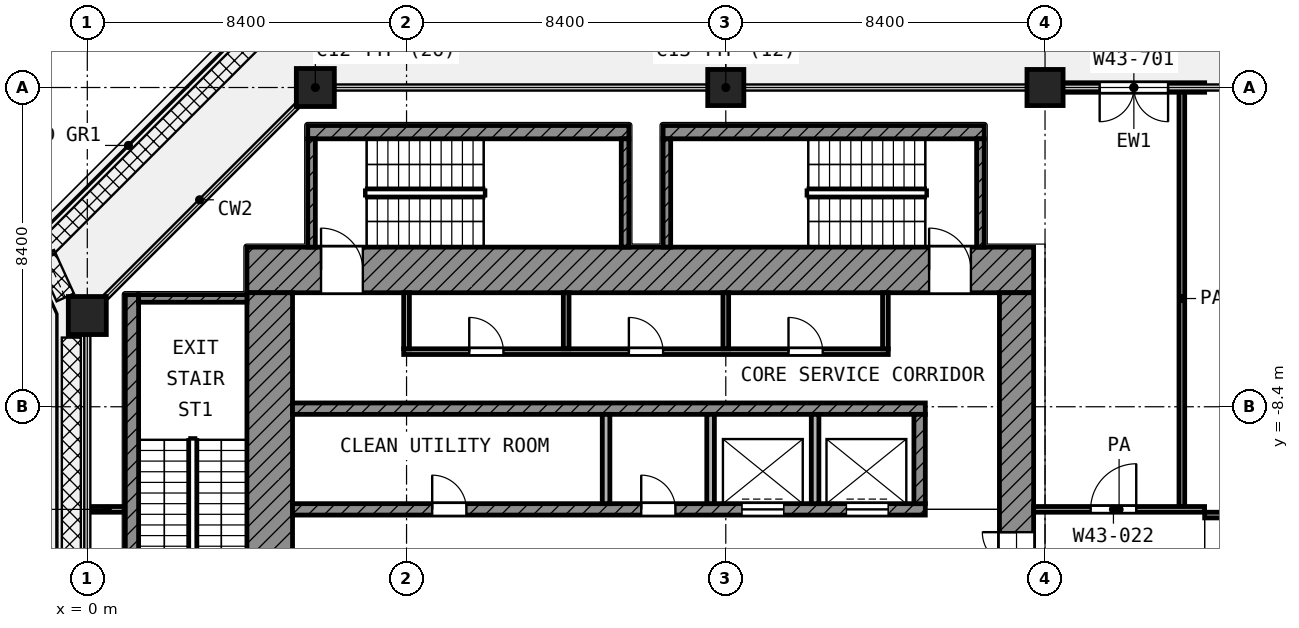
"""IFC4 building model, lengths in metres.
Left out: names, types, materials, properties, quantities, classifications, styles, units other than length and angle.
Written with IfcOpenShell. Run it as: python <this file> out.ifc"""

import sys

from ifc_helpers import new_model, si_unit, direction, frame, frame_2d, origin, origin_2d, place, context, subcontext, project, spatial, rectangle, extrude, element, fill, save


model = new_model("IFC4")
c1 = context("Model", 3, precision=1e-05, world=origin(), true_north=direction((0.0, 1.0)))
c2 = subcontext(c1, "Body", "Model", "MODEL_VIEW")
j1 = project(units=[si_unit("LENGTHUNIT", "METRE"), si_unit("PLANEANGLEUNIT", "RADIAN")], contexts=[c1])
p1 = place(None, origin())
s1 = spatial("IfcSite", under=j1, at=p1, CompositionType="ELEMENT")
p2 = place(p1, origin())
s2 = spatial("IfcBuilding", under=s1, at=p2, CompositionType="ELEMENT")
p3 = place(p2, frame((0.0, 0.0, 187.8)))
s3 = spatial("IfcBuildingStorey", under=s2, at=p3, CompositionType="ELEMENT", Elevation=187.8)
p4 = place(p3, frame((6.0, 0.0, 0.0), z_axis=(0.0, 0.0, 1.0), x_axis=(1.0, 0.0, 0.0)))
e1 = element("IfcColumn", 1, at=p4, inside=s3, PredefinedType="COLUMN", context=c2, shape_type="SweptSolid", body=[
    extrude(rectangle(XDim=1.0, YDim=1.0, at=origin_2d()), origin(), (0.0, 0.0, 1.0), 4.2),
])
for number, where, z_axis, x_axis in (
    (2, (16.8, 0.0, 0.0), (0.0, 0.0, 1.0), (1.0, 0.0, 0.0)),
    (3, (25.2, 0.0, 0.0), (0.0, 0.0, 1.0), (1.0, 0.0, 0.0)),
):
    element("IfcColumn", number, at=place(p3, frame(where, z_axis=z_axis, x_axis=x_axis)), inside=s3, PredefinedType="COLUMN", context=c2, shape_type="SweptSolid", body=[
        extrude(rectangle(XDim=0.95, YDim=0.95, at=origin_2d()), origin(), (0.0, 0.0, 1.0), 4.2),
    ])
p5 = place(p3, frame((0.0, -6.0, 0.0), z_axis=(0.0, 0.0, 1.0), x_axis=(1.0, 0.0, 0.0)))
e4 = element("IfcColumn", 4, at=p5, inside=s3, PredefinedType="COLUMN", context=c2, shape_type="SweptSolid", body=[
    extrude(rectangle(XDim=1.0, YDim=1.0, at=origin_2d()), origin(), (0.0, 0.0, 1.0), 4.2),
])
p6 = place(p3, frame((29.4, 0.0, 0.0), z_axis=(0.0, 0.0, 1.0), x_axis=(-1.0, 0.0, 0.0)))
e5 = element("IfcWall", 5, at=p6, inside=s3, PredefinedType="SOLIDWALL", context=c2, shape_type="SweptSolid", body=[
    extrude(rectangle(XDim=3.725, YDim=0.25, at=frame_2d((1.862, 0.0))), origin(), (0.0, 0.0, 1.0), 2.58),
])
p7 = place(p6, frame((0.962, 0.0, 0.0)))
e6 = element("IfcOpeningElement", 6, at=p7, cuts=e5, PredefinedType="OPENING", context=c2, shape_type="SweptSolid", body=[
    extrude(rectangle(XDim=1.8, YDim=2.1, at=frame_2d((0.9, 1.05))), frame((0.0, 0.135, 0.0), z_axis=(0.0, -1.0, 0.0), x_axis=(1.0, 0.0, 0.0)), (0.0, 0.0, 1.0), 0.27),
])
p8 = place(p3, frame((4.2, -4.8, 0.0), z_axis=(0.0, 0.0, 1.0), x_axis=(1.0, 0.0, 0.0)))
e7 = element("IfcWall", 7, at=p8, inside=s3, PredefinedType="SHEAR", context=c2, shape_type="SweptSolid", body=[
    extrude(rectangle(XDim=20.7, YDim=1.2, at=frame_2d((10.35, 0.0))), origin(), (0.0, 0.0, 1.0), 3.6),
])
p9 = place(p8, frame((1.95, 0.0, 0.0)))
e8 = element("IfcOpeningElement", 8, at=p9, cuts=e7, PredefinedType="OPENING", context=c2, shape_type="SweptSolid", body=[
    extrude(rectangle(XDim=1.1, YDim=2.1, at=frame_2d((0.55, 1.05))), frame((0.0, 0.61, 0.0), z_axis=(0.0, -1.0, 0.0), x_axis=(1.0, 0.0, 0.0)), (0.0, 0.0, 1.0), 1.22),
])
p10 = place(p8, frame((17.95, 0.0, 0.0)))
e9 = element("IfcOpeningElement", 9, at=p10, cuts=e7, PredefinedType="OPENING", context=c2, shape_type="SweptSolid", body=[
    extrude(rectangle(XDim=1.1, YDim=2.1, at=frame_2d((0.55, 1.05))), frame((0.0, 0.61, 0.0), z_axis=(0.0, -1.0, 0.0), x_axis=(1.0, 0.0, 0.0)), (0.0, 0.0, 1.0), 1.22),
])
p11 = place(p3, frame((4.8, -24.9, 0.0), z_axis=(0.0, 0.0, 1.0), x_axis=(0.0, 1.0, 0.0)))
e10 = element("IfcWall", 10, at=p11, inside=s3, PredefinedType="SHEAR", context=c2, shape_type="SweptSolid", body=[
    extrude(rectangle(XDim=19.5, YDim=1.2, at=frame_2d((9.75, 0.0))), origin(), (0.0, 0.0, 1.0), 3.6),
])
p12 = place(p11, frame((11.35, 0.0, 0.0)))
e11 = element("IfcOpeningElement", 11, at=p12, cuts=e10, PredefinedType="OPENING", context=c2, shape_type="SweptSolid", body=[
    extrude(rectangle(XDim=1.1, YDim=2.1, at=frame_2d((0.55, 1.05))), frame((0.0, 0.61, 0.0), z_axis=(0.0, -1.0, 0.0), x_axis=(1.0, 0.0, 0.0)), (0.0, 0.0, 1.0), 1.22),
])
p13 = place(p11, frame((2.05, 0.0, 0.0)))
e12 = element("IfcOpeningElement", 12, at=p13, cuts=e10, PredefinedType="OPENING", context=c2, shape_type="SweptSolid", body=[
    extrude(rectangle(XDim=1.1, YDim=2.1, at=frame_2d((0.55, 1.05))), frame((0.0, 0.61, 0.0), z_axis=(0.0, -1.0, 0.0), x_axis=(1.0, 0.0, 0.0)), (0.0, 0.0, 1.0), 1.22),
])
p14 = place(p3, frame((24.45, -24.0, 0.0), z_axis=(0.0, 0.0, 1.0), x_axis=(0.0, 1.0, 0.0)))
e13 = element("IfcWall", 13, at=p14, inside=s3, PredefinedType="SHEAR", context=c2, shape_type="SweptSolid", body=[
    extrude(rectangle(XDim=18.6, YDim=0.9, at=frame_2d((9.3, 0.0))), origin(), (0.0, 0.0, 1.0), 3.6),
])
p15 = place(p14, frame((10.5, 0.0, 0.0)))
e14 = element("IfcOpeningElement", 14, at=p15, cuts=e13, PredefinedType="OPENING", context=c2, shape_type="SweptSolid", body=[
    extrude(rectangle(XDim=1.8, YDim=2.1, at=frame_2d((0.9, 1.05))), frame((0.0, 0.46, 0.0), z_axis=(0.0, -1.0, 0.0), x_axis=(1.0, 0.0, 0.0)), (0.0, 0.0, 1.0), 0.92),
])
p16 = place(p3, frame((5.4, -8.45, 0.0), z_axis=(0.0, 0.0, 1.0), x_axis=(1.0, 0.0, 0.0)))
e15 = element("IfcWall", 15, at=p16, inside=s3, PredefinedType="SHEAR", context=c2, shape_type="SweptSolid", body=[
    extrude(rectangle(XDim=16.65, YDim=0.3, at=frame_2d((8.325, 0.0))), origin(), (0.0, 0.0, 1.0), 3.6),
])
p17 = place(p3, frame((5.4, -11.1, 0.0), z_axis=(0.0, 0.0, 1.0), x_axis=(1.0, 0.0, 0.0)))
e16 = element("IfcWall", 16, at=p17, inside=s3, PredefinedType="SHEAR", context=c2, shape_type="SweptSolid", body=[
    extrude(rectangle(XDim=16.65, YDim=0.3, at=frame_2d((8.325, 0.0))), origin(), (0.0, 0.0, 1.0), 3.6),
])
p18 = place(p17, frame((11.825, 0.0, 0.0)))
e17 = element("IfcOpeningElement", 17, at=p18, cuts=e16, PredefinedType="OPENING", context=c2, shape_type="SweptSolid", body=[
    extrude(rectangle(XDim=1.1, YDim=2.1, at=frame_2d((0.55, 1.05))), frame((0.0, 0.16, 0.0), z_axis=(0.0, -1.0, 0.0), x_axis=(1.0, 0.0, 0.0)), (0.0, 0.0, 1.0), 0.32),
])
p19 = place(p17, frame((14.575, 0.0, 0.0)))
e18 = element("IfcOpeningElement", 18, at=p19, cuts=e16, PredefinedType="OPENING", context=c2, shape_type="SweptSolid", body=[
    extrude(rectangle(XDim=1.1, YDim=2.1, at=frame_2d((0.55, 1.05))), frame((0.0, 0.16, 0.0), z_axis=(0.0, -1.0, 0.0), x_axis=(1.0, 0.0, 0.0)), (0.0, 0.0, 1.0), 0.32),
])
p20 = place(p17, frame((3.675, 0.0, 0.0)))
e19 = element("IfcOpeningElement", 19, at=p20, cuts=e16, PredefinedType="OPENING", context=c2, shape_type="SweptSolid", body=[
    extrude(rectangle(XDim=0.9, YDim=2.1, at=frame_2d((0.45, 1.05))), frame((0.0, 0.16, 0.0), z_axis=(0.0, -1.0, 0.0), x_axis=(1.0, 0.0, 0.0)), (0.0, 0.0, 1.0), 0.32),
])
p21 = place(p17, frame((9.175, 0.0, 0.0)))
e20 = element("IfcOpeningElement", 20, at=p21, cuts=e16, PredefinedType="OPENING", context=c2, shape_type="SweptSolid", body=[
    extrude(rectangle(XDim=0.9, YDim=2.1, at=frame_2d((0.45, 1.05))), frame((0.0, 0.16, 0.0), z_axis=(0.0, -1.0, 0.0), x_axis=(1.0, 0.0, 0.0)), (0.0, 0.0, 1.0), 0.32),
])
p22 = place(p3, frame((21.9, -10.95, 0.0), z_axis=(0.0, 0.0, 1.0), x_axis=(0.0, 1.0, 0.0)))
e21 = element("IfcWall", 21, at=p22, inside=s3, PredefinedType="SHEAR", context=c2, shape_type="SweptSolid", body=[
    extrude(rectangle(XDim=2.35, YDim=0.3, at=frame_2d((1.175, 0.0))), origin(), (0.0, 0.0, 1.0), 3.6),
])
for number, where, z_axis, x_axis in (
    (22, (13.65, -10.95, 0.0), (0.0, 0.0, 1.0), (0.0, 1.0, 0.0)),
    (23, (16.4, -10.95, 0.0), (0.0, 0.0, 1.0), (0.0, 1.0, 0.0)),
    (24, (19.15, -10.95, 0.0), (0.0, 0.0, 1.0), (0.0, 1.0, 0.0)),
):
    element("IfcWall", number, at=place(p3, frame(where, z_axis=z_axis, x_axis=x_axis)), inside=s3, PredefinedType="PARTITIONING", context=c2, shape_type="SweptSolid", body=[
        extrude(rectangle(XDim=2.35, YDim=0.2, at=frame_2d((1.175, 0.0))), origin(), (0.0, 0.0, 1.0), 3.6),
    ])
p23 = place(p3, frame((8.325, -6.95, 0.0), z_axis=(0.0, 0.0, 1.0), x_axis=(1.0, 0.0, 0.0)))
e25 = element("IfcWall", 25, at=p23, inside=s3, PredefinedType="PARTITIONING", context=c2, shape_type="SweptSolid", body=[
    extrude(rectangle(XDim=12.75, YDim=0.15, at=frame_2d((6.375, 0.0))), origin(), (0.0, 0.0, 1.0), 3.6),
])
p24 = place(p23, frame((1.725, 0.0, 0.0)))
e26 = element("IfcOpeningElement", 26, at=p24, cuts=e25, PredefinedType="OPENING", context=c2, shape_type="SweptSolid", body=[
    extrude(rectangle(XDim=0.9, YDim=2.1, at=frame_2d((0.45, 1.05))), frame((0.0, 0.085, 0.0), z_axis=(0.0, -1.0, 0.0), x_axis=(1.0, 0.0, 0.0)), (0.0, 0.0, 1.0), 0.17),
])
p25 = place(p23, frame((5.925, 0.0, 0.0)))
e27 = element("IfcOpeningElement", 27, at=p25, cuts=e25, PredefinedType="OPENING", context=c2, shape_type="SweptSolid", body=[
    extrude(rectangle(XDim=0.9, YDim=2.1, at=frame_2d((0.45, 1.05))), frame((0.0, 0.085, 0.0), z_axis=(0.0, -1.0, 0.0), x_axis=(1.0, 0.0, 0.0)), (0.0, 0.0, 1.0), 0.17),
])
p26 = place(p23, frame((10.125, 0.0, 0.0)))
e28 = element("IfcOpeningElement", 28, at=p26, cuts=e25, PredefinedType="OPENING", context=c2, shape_type="SweptSolid", body=[
    extrude(rectangle(XDim=0.9, YDim=2.1, at=frame_2d((0.45, 1.05))), frame((0.0, 0.085, 0.0), z_axis=(0.0, -1.0, 0.0), x_axis=(1.0, 0.0, 0.0)), (0.0, 0.0, 1.0), 0.17),
])
for number, where, z_axis, x_axis in (
    (29, (8.4, -6.875, 0.0), (0.0, 0.0, 1.0), (0.0, 1.0, 0.0)),
    (30, (12.6, -6.875, 0.0), (0.0, 0.0, 1.0), (0.0, 1.0, 0.0)),
    (31, (16.8, -6.875, 0.0), (0.0, 0.0, 1.0), (0.0, 1.0, 0.0)),
    (32, (21.0, -6.875, 0.0), (0.0, 0.0, 1.0), (0.0, 1.0, 0.0)),
):
    element("IfcWall", number, at=place(p3, frame(where, z_axis=z_axis, x_axis=x_axis)), inside=s3, PredefinedType="PARTITIONING", context=c2, shape_type="SweptSolid", body=[
        extrude(rectangle(XDim=1.475, YDim=0.15, at=frame_2d((0.738, 0.0))), origin(), (0.0, 0.0, 1.0), 3.6),
    ])
p27 = place(p3, frame((1.175, -13.9, 0.0), z_axis=(0.0, 0.0, 1.0), x_axis=(0.0, 1.0, 0.0)))
e33 = element("IfcWall", 33, at=p27, inside=s3, PredefinedType="SHEAR", context=c2, shape_type="SweptSolid", body=[
    extrude(rectangle(XDim=8.45, YDim=0.35, at=frame_2d((4.225, 0.0))), origin(), (0.0, 0.0, 1.0), 3.6),
])
p28 = place(p3, frame((1.35, -5.55, 0.0), z_axis=(0.0, 0.0, 1.0), x_axis=(1.0, 0.0, 0.0)))
e34 = element("IfcWall", 34, at=p28, inside=s3, PredefinedType="SHEAR", context=c2, shape_type="SweptSolid", body=[
    extrude(rectangle(XDim=2.85, YDim=0.2, at=frame_2d((1.425, 0.0))), origin(), (0.0, 0.0, 1.0), 3.6),
])
p29 = place(p3, frame((5.8, -1.175, 0.0), z_axis=(0.0, 0.0, 1.0), x_axis=(1.0, 0.0, 0.0)))
e35 = element("IfcWall", 35, at=p29, inside=s3, PredefinedType="SHEAR", context=c2, shape_type="SweptSolid", body=[
    extrude(rectangle(XDim=8.45, YDim=0.35, at=frame_2d((4.225, 0.0))), origin(), (0.0, 0.0, 1.0), 3.6),
])
for number, where, z_axis, x_axis in (
    (36, (5.9, -4.2, 0.0), (0.0, 0.0, 1.0), (0.0, 1.0, 0.0)),
    (37, (14.15, -4.2, 0.0), (0.0, 0.0, 1.0), (0.0, 1.0, 0.0)),
):
    element("IfcWall", number, at=place(p3, frame(where, z_axis=z_axis, x_axis=x_axis)), inside=s3, PredefinedType="SHEAR", context=c2, shape_type="SweptSolid", body=[
        extrude(rectangle(XDim=2.85, YDim=0.2, at=frame_2d((1.425, 0.0))), origin(), (0.0, 0.0, 1.0), 3.6),
    ])
p30 = place(p3, frame((15.15, -1.175, 0.0), z_axis=(0.0, 0.0, 1.0), x_axis=(1.0, 0.0, 0.0)))
e38 = element("IfcWall", 38, at=p30, inside=s3, PredefinedType="SHEAR", context=c2, shape_type="SweptSolid", body=[
    extrude(rectangle(XDim=8.45, YDim=0.35, at=frame_2d((4.225, 0.0))), origin(), (0.0, 0.0, 1.0), 3.6),
])
for number, where, z_axis, x_axis in (
    (39, (15.25, -4.2, 0.0), (0.0, 0.0, 1.0), (0.0, 1.0, 0.0)),
    (40, (23.5, -4.2, 0.0), (0.0, 0.0, 1.0), (0.0, 1.0, 0.0)),
):
    element("IfcWall", number, at=place(p3, frame(where, z_axis=z_axis, x_axis=x_axis)), inside=s3, PredefinedType="SHEAR", context=c2, shape_type="SweptSolid", body=[
        extrude(rectangle(XDim=2.85, YDim=0.2, at=frame_2d((1.425, 0.0))), origin(), (0.0, 0.0, 1.0), 3.6),
    ])
p31 = place(p3, frame((29.4, -11.25, 0.0), z_axis=(0.0, 0.0, 1.0), x_axis=(1.0, 0.0, 0.0)))
e41 = element("IfcWall", 41, at=p31, inside=s3, PredefinedType="PARTITIONING", context=c2, shape_type="SweptSolid", body=[
    extrude(rectangle(XDim=10.782, YDim=0.15, at=frame_2d((5.391, 0.0))), origin(), (0.0, 0.0, 1.0), 3.6),
])
p32 = place(p31, frame((1.6, 0.0, 0.0)))
e42 = element("IfcOpeningElement", 42, at=p32, cuts=e41, PredefinedType="OPENING", context=c2, shape_type="SweptSolid", body=[
    extrude(rectangle(XDim=1.0, YDim=2.1, at=frame_2d((0.5, 1.05))), frame((0.0, 0.085, 0.0), z_axis=(0.0, -1.0, 0.0), x_axis=(1.0, 0.0, 0.0)), (0.0, 0.0, 1.0), 0.17),
])
p33 = place(p31, frame((4.8, 0.0, 0.0)))
e43 = element("IfcOpeningElement", 43, at=p33, cuts=e41, PredefinedType="OPENING", context=c2, shape_type="SweptSolid", body=[
    extrude(rectangle(XDim=0.9, YDim=2.1, at=frame_2d((0.45, 1.05))), frame((0.0, 0.085, 0.0), z_axis=(0.0, -1.0, 0.0), x_axis=(1.0, 0.0, 0.0)), (0.0, 0.0, 1.0), 0.17),
])
p34 = place(p31, frame((6.85, 0.0, 0.0)))
e44 = element("IfcOpeningElement", 44, at=p34, cuts=e41, PredefinedType="OPENING", context=c2, shape_type="SweptSolid", body=[
    extrude(rectangle(XDim=1.0, YDim=2.1, at=frame_2d((0.5, 1.05))), frame((0.0, 0.085, 0.0), z_axis=(0.0, -1.0, 0.0), x_axis=(1.0, 0.0, 0.0)), (0.0, 0.0, 1.0), 0.17),
])
p35 = place(p3, frame((0.08, -11.1, 0.0), z_axis=(0.0, 0.0, 1.0), x_axis=(1.0, 0.0, 0.0)))
e45 = element("IfcWall", 45, at=p35, inside=s3, PredefinedType="PARTITIONING", context=c2, shape_type="SweptSolid", body=[
    extrude(rectangle(XDim=0.89, YDim=0.15, at=frame_2d((0.445, 0.0))), origin(), (0.0, 0.0, 1.0), 3.6),
])
p36 = place(p3, frame((24.9, -11.1, 0.0), z_axis=(0.0, 0.0, 1.0), x_axis=(1.0, 0.0, 0.0)))
e46 = element("IfcWall", 46, at=p36, inside=s3, PredefinedType="PARTITIONING", context=c2, shape_type="SweptSolid", body=[
    extrude(rectangle(XDim=4.498, YDim=0.15, at=frame_2d((2.249, 0.0))), origin(), (0.0, 0.0, 1.0), 3.6),
])
p37 = place(p36, frame((1.5, 0.0, 0.0)))
e47 = element("IfcOpeningElement", 47, at=p37, cuts=e46, PredefinedType="OPENING", context=c2, shape_type="SweptSolid", body=[
    extrude(rectangle(XDim=1.2, YDim=2.1, at=frame_2d((0.6, 1.05))), frame((0.0, 0.085, 0.0), z_axis=(0.0, -1.0, 0.0), x_axis=(1.0, 0.0, 0.0)), (0.0, 0.0, 1.0), 0.17),
])
p38 = place(p3, frame((28.8, -11.025, 0.0), z_axis=(0.0, 0.0, 1.0), x_axis=(0.0, 1.0, 0.0)))
e48 = element("IfcWall", 48, at=p38, inside=s3, PredefinedType="PARTITIONING", context=c2, shape_type="SweptSolid", body=[
    extrude(rectangle(XDim=10.945, YDim=0.15, at=frame_2d((5.472, 0.0))), origin(), (0.0, 0.0, 1.0), 2.7),
])
p39 = place(p7, origin())
e49 = element("IfcDoor", 49, at=p39, inside=s3, OperationType="DOUBLE_DOOR_SINGLE_SWING", PredefinedType="DOOR", context=c2, shape_type="SweptSolid", body=[
    extrude(rectangle(XDim=1.8, YDim=2.1, at=frame_2d((0.9, 1.05))), frame((0.0, 0.025, 0.0), z_axis=(0.0, -1.0, 0.0), x_axis=(1.0, 0.0, 0.0)), (0.0, 0.0, 1.0), 0.05),
])
fill(e6, e49)
p40 = place(p18, origin())
e50 = element("IfcDoor", 50, at=p40, inside=s3, OperationType="DOUBLE_DOOR_SLIDING", PredefinedType="DOOR", context=c2, shape_type="SweptSolid", body=[
    extrude(rectangle(XDim=1.1, YDim=2.1, at=frame_2d((0.55, 1.05))), frame((0.0, 0.025, 0.0), z_axis=(0.0, -1.0, 0.0), x_axis=(1.0, 0.0, 0.0)), (0.0, 0.0, 1.0), 0.05),
])
fill(e17, e50)
p41 = place(p19, origin())
e51 = element("IfcDoor", 51, at=p41, inside=s3, OperationType="DOUBLE_DOOR_SLIDING", PredefinedType="DOOR", context=c2, shape_type="SweptSolid", body=[
    extrude(rectangle(XDim=1.1, YDim=2.1, at=frame_2d((0.55, 1.05))), frame((0.0, 0.025, 0.0), z_axis=(0.0, -1.0, 0.0), x_axis=(1.0, 0.0, 0.0)), (0.0, 0.0, 1.0), 0.05),
])
fill(e18, e51)
p42 = place(p9, origin())
e52 = element("IfcDoor", 52, at=p42, inside=s3, OperationType="SINGLE_SWING_LEFT", PredefinedType="DOOR", context=c2, shape_type="SweptSolid", body=[
    extrude(rectangle(XDim=1.1, YDim=2.1, at=frame_2d((0.55, 1.05))), frame((0.0, 0.025, 0.0), z_axis=(0.0, -1.0, 0.0), x_axis=(1.0, 0.0, 0.0)), (0.0, 0.0, 1.0), 0.05),
])
fill(e8, e52)
p43 = place(p10, origin())
e53 = element("IfcDoor", 53, at=p43, inside=s3, OperationType="SINGLE_SWING_LEFT", PredefinedType="DOOR", context=c2, shape_type="SweptSolid", body=[
    extrude(rectangle(XDim=1.1, YDim=2.1, at=frame_2d((0.55, 1.05))), frame((0.0, 0.025, 0.0), z_axis=(0.0, -1.0, 0.0), x_axis=(1.0, 0.0, 0.0)), (0.0, 0.0, 1.0), 0.05),
])
fill(e9, e53)
p44 = place(p15, origin())
e54 = element("IfcDoor", 54, at=p44, inside=s3, OperationType="DOUBLE_DOOR_SINGLE_SWING", PredefinedType="DOOR", context=c2, shape_type="SweptSolid", body=[
    extrude(rectangle(XDim=1.8, YDim=2.1, at=frame_2d((0.9, 1.05))), frame((0.0, 0.025, 0.0), z_axis=(0.0, -1.0, 0.0), x_axis=(1.0, 0.0, 0.0)), (0.0, 0.0, 1.0), 0.05),
])
fill(e14, e54)
p45 = place(p24, origin())
e55 = element("IfcDoor", 55, at=p45, inside=s3, OperationType="SINGLE_SWING_LEFT", PredefinedType="DOOR", context=c2, shape_type="SweptSolid", body=[
    extrude(rectangle(XDim=0.9, YDim=2.1, at=frame_2d((0.45, 1.05))), frame((0.0, 0.025, 0.0), z_axis=(0.0, -1.0, 0.0), x_axis=(1.0, 0.0, 0.0)), (0.0, 0.0, 1.0), 0.05),
])
fill(e26, e55)
p46 = place(p25, origin())
e56 = element("IfcDoor", 56, at=p46, inside=s3, OperationType="SINGLE_SWING_LEFT", PredefinedType="DOOR", context=c2, shape_type="SweptSolid", body=[
    extrude(rectangle(XDim=0.9, YDim=2.1, at=frame_2d((0.45, 1.05))), frame((0.0, 0.025, 0.0), z_axis=(0.0, -1.0, 0.0), x_axis=(1.0, 0.0, 0.0)), (0.0, 0.0, 1.0), 0.05),
])
fill(e27, e56)
p47 = place(p26, origin())
e57 = element("IfcDoor", 57, at=p47, inside=s3, OperationType="SINGLE_SWING_LEFT", PredefinedType="DOOR", context=c2, shape_type="SweptSolid", body=[
    extrude(rectangle(XDim=0.9, YDim=2.1, at=frame_2d((0.45, 1.05))), frame((0.0, 0.025, 0.0), z_axis=(0.0, -1.0, 0.0), x_axis=(1.0, 0.0, 0.0)), (0.0, 0.0, 1.0), 0.05),
])
fill(e28, e57)
p48 = place(p20, origin())
e58 = element("IfcDoor", 58, at=p48, inside=s3, OperationType="SINGLE_SWING_LEFT", PredefinedType="DOOR", context=c2, shape_type="SweptSolid", body=[
    extrude(rectangle(XDim=0.9, YDim=2.1, at=frame_2d((0.45, 1.05))), frame((0.0, 0.025, 0.0), z_axis=(0.0, -1.0, 0.0), x_axis=(1.0, 0.0, 0.0)), (0.0, 0.0, 1.0), 0.05),
])
fill(e19, e58)
p49 = place(p21, origin())
e59 = element("IfcDoor", 59, at=p49, inside=s3, OperationType="SINGLE_SWING_LEFT", PredefinedType="DOOR", context=c2, shape_type="SweptSolid", body=[
    extrude(rectangle(XDim=0.9, YDim=2.1, at=frame_2d((0.45, 1.05))), frame((0.0, 0.025, 0.0), z_axis=(0.0, -1.0, 0.0), x_axis=(1.0, 0.0, 0.0)), (0.0, 0.0, 1.0), 0.05),
])
fill(e20, e59)
p50 = place(p37, origin())
e60 = element("IfcDoor", 60, at=p50, inside=s3, OperationType="SINGLE_SWING_RIGHT", PredefinedType="DOOR", context=c2, shape_type="SweptSolid", body=[
    extrude(rectangle(XDim=1.2, YDim=2.1, at=frame_2d((0.6, 1.05))), frame((0.0, 0.025, 0.0), z_axis=(0.0, -1.0, 0.0), x_axis=(1.0, 0.0, 0.0)), (0.0, 0.0, 1.0), 0.05),
])
fill(e47, e60)
save(model, sys.argv[1])
